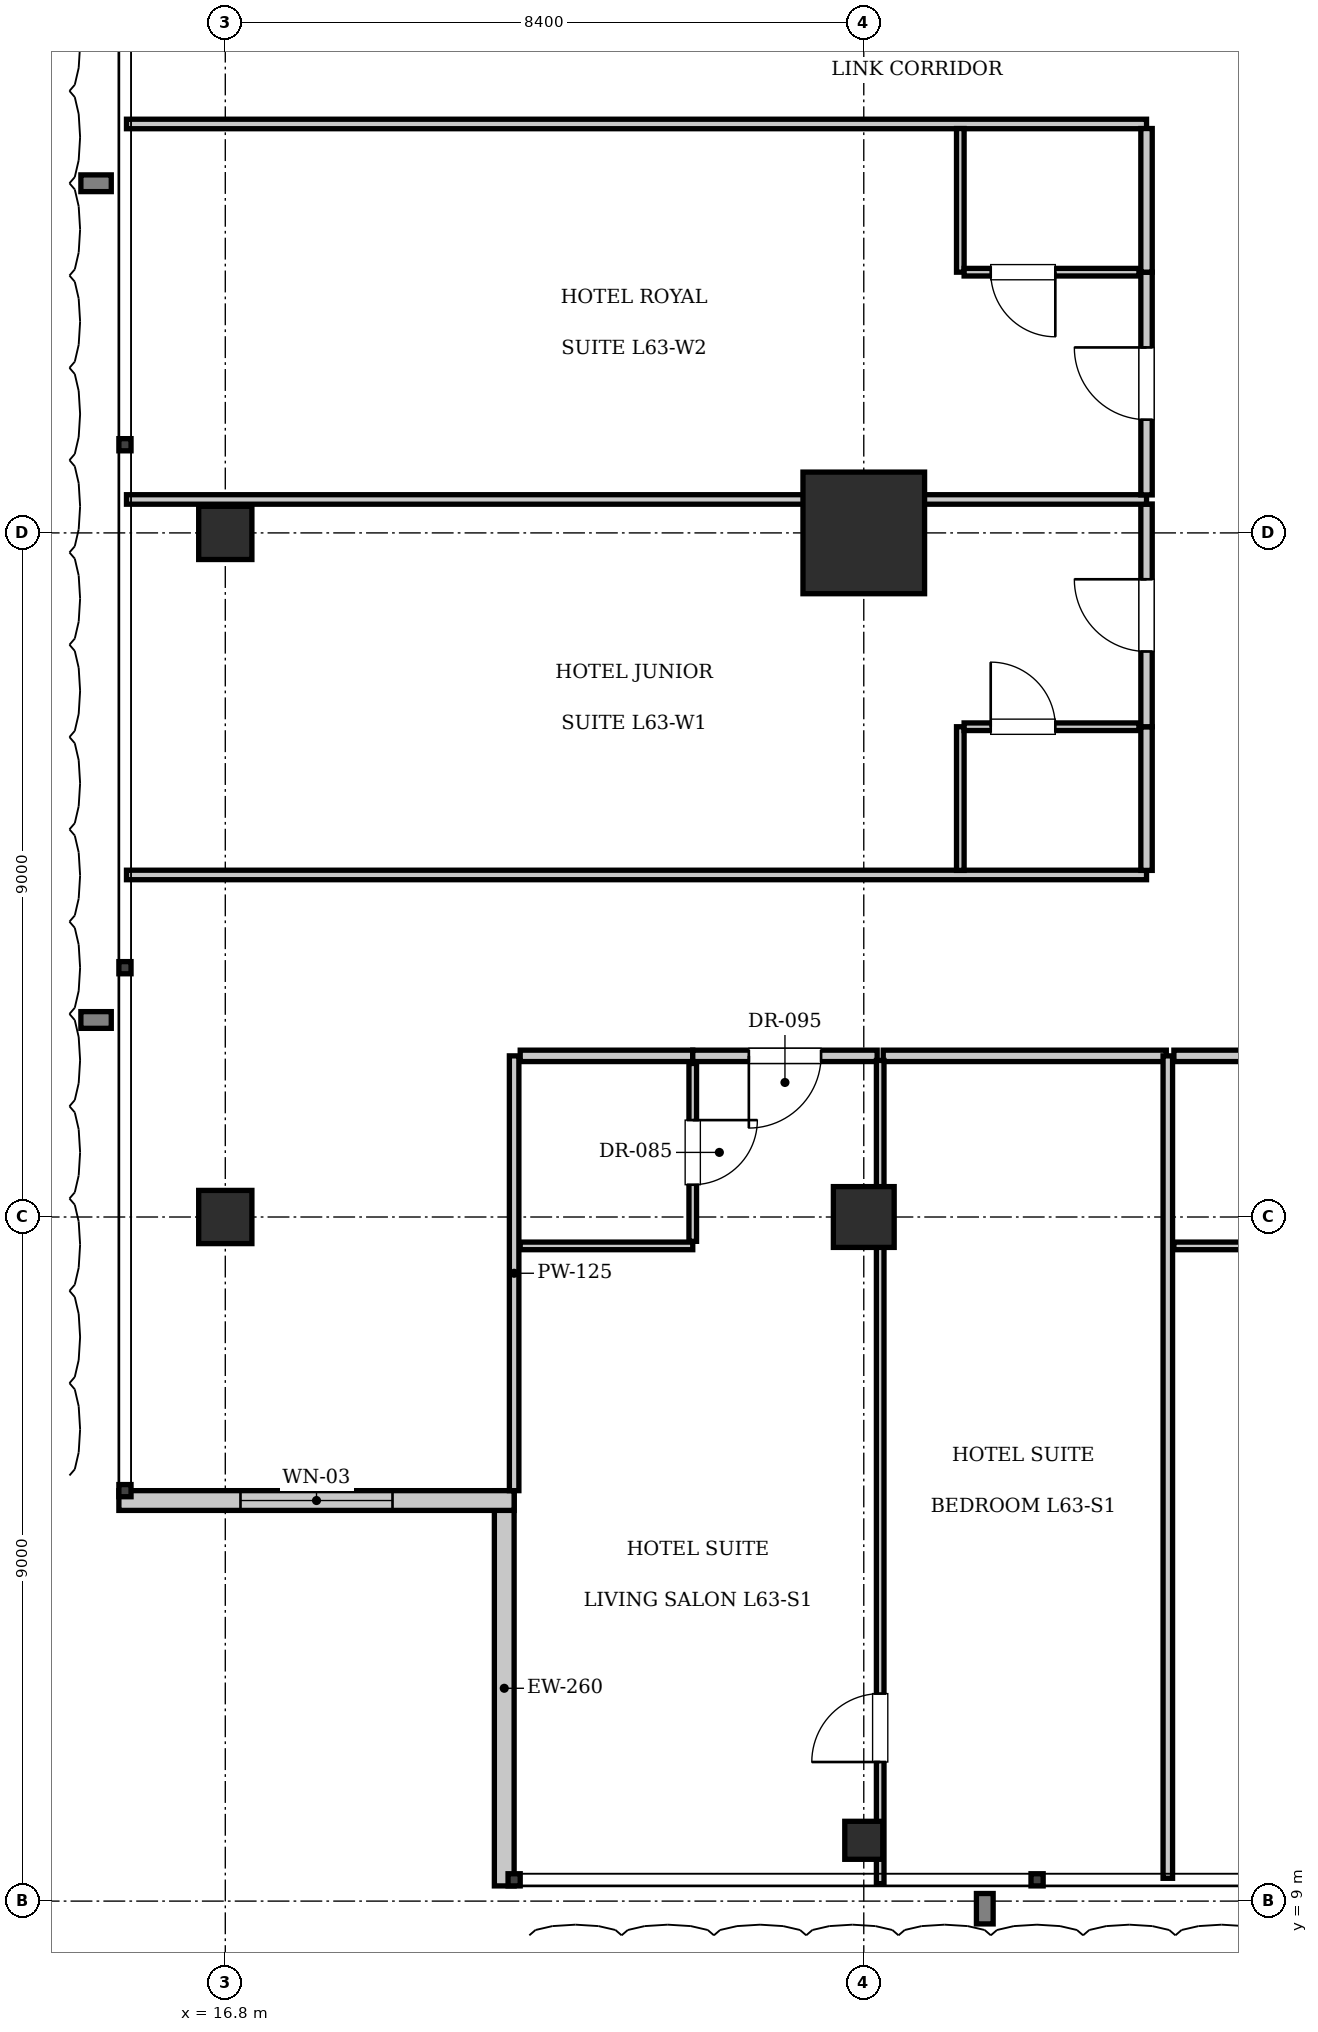
"""IFC4 building model, lengths in metres.
Left out: names, types, materials, properties, quantities, classifications, styles, units other than length and angle.
Written with IfcOpenShell. Run it as: python <this file> out.ifc"""

import sys

from ifc_helpers import new_model, si_unit, direction, frame, frame_2d, origin, origin_2d, place, context, subcontext, project, spatial, rectangle, i_section, extrude, element, fill, save


model = new_model("IFC4")
c1 = context("Model", 3, precision=1e-05, world=origin(), true_north=direction((0.0, 1.0)))
c2 = subcontext(c1, "Body", "Model", "MODEL_VIEW")
j1 = project(units=[si_unit("LENGTHUNIT", "METRE"), si_unit("PLANEANGLEUNIT", "RADIAN")], contexts=[c1])
p1 = place(None, origin())
s1 = spatial("IfcSite", under=j1, at=p1, CompositionType="ELEMENT")
p2 = place(p1, origin())
s2 = spatial("IfcBuilding", under=s1, at=p2, CompositionType="ELEMENT")
p3 = place(p2, frame((0.0, 0.0, 258.65)))
s3 = spatial("IfcBuildingStorey", under=s2, at=p3, CompositionType="ELEMENT", Elevation=258.65)
p4 = place(p3, frame((25.2, 27.0, 0.0), z_axis=(0.0, 0.0, 1.0), x_axis=(1.0, 0.0, 0.0)))
e1 = element("IfcColumn", 1, at=p4, inside=s3, PredefinedType="COLUMN", context=c2, shape_type="SweptSolid", body=[
    extrude(rectangle(XDim=1.6, YDim=1.6, at=origin_2d()), origin(), (0.0, 0.0, 1.0), 3.85),
])
p5 = place(p3, frame((25.2, 18.0, 0.0), z_axis=(0.0, 0.0, 1.0), x_axis=(1.0, 0.0, 0.0)))
e2 = element("IfcColumn", 2, at=p5, inside=s3, PredefinedType="COLUMN", context=c2, shape_type="SweptSolid", body=[
    extrude(rectangle(XDim=0.8, YDim=0.8, at=origin_2d()), origin(), (0.0, 0.0, 1.0), 3.85),
])
for number, where, z_axis, x_axis in (
    (3, (16.8, 18.0, 0.0), (0.0, 0.0, 1.0), (1.0, 0.0, 0.0)),
    (4, (16.8, 27.0, 0.0), (0.0, 0.0, 1.0), (1.0, 0.0, 0.0)),
):
    element("IfcColumn", number, at=place(p3, frame(where, z_axis=z_axis, x_axis=x_axis)), inside=s3, PredefinedType="COLUMN", context=c2, shape_type="SweptSolid", body=[
        extrude(rectangle(XDim=0.7, YDim=0.7, at=origin_2d()), origin(), (0.0, 0.0, 1.0), 3.85),
    ])
p6 = place(p3, frame((25.2, 9.8, 0.0), z_axis=(0.0, 0.0, 1.0), x_axis=(1.0, 0.0, 0.0)))
e5 = element("IfcColumn", 5, at=p6, inside=s3, PredefinedType="COLUMN", context=c2, shape_type="SweptSolid", body=[
    extrude(i_section(OverallWidth=0.5, OverallDepth=0.5, WebThickness=0.022, FlangeThickness=0.032, at=origin_2d()), origin(), (0.0, 0.0, 1.0), 3.85),
])
p7 = place(p3, frame((20.47, 9.2, 0.0), z_axis=(0.0, 0.0, 1.0), x_axis=(0.0, 1.0, 0.0)))
e6 = element("IfcWall", 6, at=p7, inside=s3, PredefinedType="SOLIDWALL", context=c2, shape_type="SweptSolid", body=[
    extrude(rectangle(XDim=5.2, YDim=0.26, at=frame_2d((2.6, 0.0))), origin(), (0.0, 0.0, 1.0), 3.61),
])
p8 = place(p3, frame((20.6, 14.27, 0.0), z_axis=(0.0, 0.0, 1.0), x_axis=(-1.0, 0.0, 0.0)))
e7 = element("IfcWall", 7, at=p8, inside=s3, PredefinedType="SOLIDWALL", context=c2, shape_type="SweptSolid", body=[
    extrude(rectangle(XDim=5.2, YDim=0.26, at=frame_2d((2.6, 0.0))), origin(), (0.0, 0.0, 1.0), 3.61),
])
p9 = place(p8, frame((1.6, 0.0, 0.9)))
e8 = element("IfcOpeningElement", 8, at=p9, cuts=e7, PredefinedType="OPENING", context=c2, shape_type="SweptSolid", body=[
    extrude(rectangle(XDim=2.0, YDim=2.2, at=frame_2d((1.0, 1.1))), frame((0.0, 0.14, 0.0), z_axis=(0.0, -1.0, 0.0), x_axis=(1.0, 0.0, 0.0)), (0.0, 0.0, 1.0), 0.28),
])
p10 = place(p3, frame((20.6, 14.4, 0.0), z_axis=(0.0, 0.0, 1.0), x_axis=(0.0, 1.0, 0.0)))
e9 = element("IfcWall", 9, at=p10, inside=s3, PredefinedType="PARTITIONING", context=c2, shape_type="SweptSolid", body=[
    extrude(rectangle(XDim=5.72, YDim=0.125, at=frame_2d((2.86, 0.0))), origin(), (0.0, 0.0, 1.0), 3.61),
])
p11 = place(p3, frame((20.68, 20.12, 0.0), z_axis=(0.0, 0.0, 1.0), x_axis=(1.0, 0.0, 0.0)))
e10 = element("IfcWall", 10, at=p11, inside=s3, PredefinedType="PARTITIONING", context=c2, shape_type="SweptSolid", body=[
    extrude(rectangle(XDim=2.27, YDim=0.15, at=frame_2d((1.135, 0.0))), origin(), (0.0, 0.0, 1.0), 3.61),
])
p12 = place(p3, frame((20.68, 17.62, 0.0), z_axis=(0.0, 0.0, 1.0), x_axis=(1.0, 0.0, 0.0)))
e11 = element("IfcWall", 11, at=p12, inside=s3, PredefinedType="PARTITIONING", context=c2, shape_type="SweptSolid", body=[
    extrude(rectangle(XDim=2.27, YDim=0.1, at=frame_2d((1.135, 0.0))), origin(), (0.0, 0.0, 1.0), 3.61),
])
p13 = place(p3, frame((22.95, 17.68, 0.0), z_axis=(0.0, 0.0, 1.0), x_axis=(0.0, 1.0, 0.0)))
e12 = element("IfcWall", 12, at=p13, inside=s3, PredefinedType="PARTITIONING", context=c2, shape_type="SweptSolid", body=[
    extrude(rectangle(XDim=2.34, YDim=0.1, at=frame_2d((1.17, 0.0))), origin(), (0.0, 0.0, 1.0), 3.61),
])
p14 = place(p13, frame((0.745, 0.0, 0.0)))
e13 = element("IfcOpeningElement", 13, at=p14, cuts=e12, PredefinedType="OPENING", context=c2, shape_type="SweptSolid", body=[
    extrude(rectangle(XDim=0.85, YDim=2.1, at=frame_2d((0.425, 1.05))), frame((0.0, 0.06, 0.0), z_axis=(0.0, -1.0, 0.0), x_axis=(1.0, 0.0, 0.0)), (0.0, 0.0, 1.0), 0.12),
])
p15 = place(p3, frame((22.95, 20.12, 0.0), z_axis=(0.0, 0.0, 1.0), x_axis=(1.0, 0.0, 0.0)))
e14 = element("IfcWall", 14, at=p15, inside=s3, PredefinedType="PARTITIONING", context=c2, shape_type="SweptSolid", body=[
    extrude(rectangle(XDim=2.426, YDim=0.15, at=frame_2d((1.213, 0.0))), origin(), (0.0, 0.0, 1.0), 3.61),
])
p16 = place(p15, frame((0.738, 0.0, 0.0)))
e15 = element("IfcOpeningElement", 15, at=p16, cuts=e14, PredefinedType="OPENING", context=c2, shape_type="SweptSolid", body=[
    extrude(rectangle(XDim=0.95, YDim=2.15, at=frame_2d((0.475, 1.075))), frame((0.0, 0.085, 0.0), z_axis=(0.0, -1.0, 0.0), x_axis=(1.0, 0.0, 0.0)), (0.0, 0.0, 1.0), 0.17),
])
p17 = place(p3, frame((25.456, 20.12, 0.0), z_axis=(0.0, 0.0, 1.0), x_axis=(1.0, 0.0, 0.0)))
e16 = element("IfcWall", 16, at=p17, inside=s3, PredefinedType="PARTITIONING", context=c2, shape_type="SweptSolid", body=[
    extrude(rectangle(XDim=3.724, YDim=0.15, at=frame_2d((1.862, 0.0))), origin(), (0.0, 0.0, 1.0), 3.61),
])
p18 = place(p3, frame((25.416, 9.23, 0.0), z_axis=(0.0, 0.0, 1.0), x_axis=(0.0, 1.0, 0.0)))
e17 = element("IfcWall", 17, at=p18, inside=s3, PredefinedType="PARTITIONING", context=c2, shape_type="SweptSolid", body=[
    extrude(rectangle(XDim=10.83, YDim=0.1, at=frame_2d((5.415, 0.0))), origin(), (0.0, 0.0, 1.0), 3.61),
])
p19 = place(p18, frame((1.6, 0.0, 0.0)))
e18 = element("IfcOpeningElement", 18, at=p19, cuts=e17, PredefinedType="OPENING", context=c2, shape_type="SweptSolid", body=[
    extrude(rectangle(XDim=0.9, YDim=2.1, at=frame_2d((0.45, 1.05))), frame((0.0, 0.06, 0.0), z_axis=(0.0, -1.0, 0.0), x_axis=(1.0, 0.0, 0.0)), (0.0, 0.0, 1.0), 0.12),
])
p20 = place(p3, frame((29.2, 9.3, 0.0), z_axis=(0.0, 0.0, 1.0), x_axis=(0.0, 1.0, 0.0)))
e19 = element("IfcWall", 19, at=p20, inside=s3, PredefinedType="PARTITIONING", context=c2, shape_type="SweptSolid", body=[
    extrude(rectangle(XDim=10.82, YDim=0.125, at=frame_2d((5.41, 0.0))), origin(), (0.0, 0.0, 1.0), 3.61),
])
p21 = place(p3, frame((29.28, 20.12, 0.0), z_axis=(0.0, 0.0, 1.0), x_axis=(1.0, 0.0, 0.0)))
e20 = element("IfcWall", 20, at=p21, inside=s3, PredefinedType="PARTITIONING", context=c2, shape_type="SweptSolid", body=[
    extrude(rectangle(XDim=2.27, YDim=0.15, at=frame_2d((1.135, 0.0))), origin(), (0.0, 0.0, 1.0), 3.61),
])
p22 = place(p3, frame((29.28, 17.62, 0.0), z_axis=(0.0, 0.0, 1.0), x_axis=(1.0, 0.0, 0.0)))
e21 = element("IfcWall", 21, at=p22, inside=s3, PredefinedType="PARTITIONING", context=c2, shape_type="SweptSolid", body=[
    extrude(rectangle(XDim=2.27, YDim=0.1, at=frame_2d((1.135, 0.0))), origin(), (0.0, 0.0, 1.0), 3.61),
])
for number, where, z_axis, x_axis in (
    (22, (15.5, 22.5, 0.0), (0.0, 0.0, 1.0), (1.0, 0.0, 0.0)),
    (23, (15.5, 32.38, 0.0), (0.0, 0.0, 1.0), (1.0, 0.0, 0.0)),
):
    element("IfcWall", number, at=place(p3, frame(where, z_axis=z_axis, x_axis=x_axis)), inside=s3, PredefinedType="PARTITIONING", context=c2, shape_type="SweptSolid", body=[
        extrude(rectangle(XDim=13.42, YDim=0.125, at=frame_2d((6.71, 0.0))), origin(), (0.0, 0.0, 1.0), 3.61),
    ])
p23 = place(p3, frame((28.92, 22.56, 0.0), z_axis=(0.0, 0.0, 1.0), x_axis=(0.0, 1.0, 0.0)))
e24 = element("IfcWall", 24, at=p23, inside=s3, PredefinedType="PARTITIONING", context=c2, shape_type="SweptSolid", body=[
    extrude(rectangle(XDim=1.89, YDim=0.15, at=frame_2d((0.945, 0.0))), origin(), (0.0, 0.0, 1.0), 3.61),
])
p24 = place(p3, frame((28.92, 24.45, 0.0), z_axis=(0.0, 0.0, 1.0), x_axis=(0.0, 1.0, 0.0)))
e25 = element("IfcWall", 25, at=p24, inside=s3, PredefinedType="PARTITIONING", context=c2, shape_type="SweptSolid", body=[
    extrude(rectangle(XDim=2.93, YDim=0.15, at=frame_2d((1.465, 0.0))), origin(), (0.0, 0.0, 1.0), 3.61),
])
p25 = place(p24, frame((0.99, 0.0, 0.0)))
e26 = element("IfcOpeningElement", 26, at=p25, cuts=e25, PredefinedType="OPENING", context=c2, shape_type="SweptSolid", body=[
    extrude(rectangle(XDim=0.95, YDim=2.15, at=frame_2d((0.475, 1.075))), frame((0.0, 0.085, 0.0), z_axis=(0.0, -1.0, 0.0), x_axis=(1.0, 0.0, 0.0)), (0.0, 0.0, 1.0), 0.17),
])
p26 = place(p3, frame((26.47, 22.56, 0.0), z_axis=(0.0, 0.0, 1.0), x_axis=(0.0, 1.0, 0.0)))
e27 = element("IfcWall", 27, at=p26, inside=s3, PredefinedType="PARTITIONING", context=c2, shape_type="SweptSolid", body=[
    extrude(rectangle(XDim=1.89, YDim=0.1, at=frame_2d((0.945, 0.0))), origin(), (0.0, 0.0, 1.0), 3.61),
])
p27 = place(p3, frame((26.52, 24.45, 0.0), z_axis=(0.0, 0.0, 1.0), x_axis=(1.0, 0.0, 0.0)))
e28 = element("IfcWall", 28, at=p27, inside=s3, PredefinedType="PARTITIONING", context=c2, shape_type="SweptSolid", body=[
    extrude(rectangle(XDim=2.3, YDim=0.1, at=frame_2d((1.15, 0.0))), origin(), (0.0, 0.0, 1.0), 3.61),
])
p28 = place(p27, frame((0.35, 0.0, 0.0)))
e29 = element("IfcOpeningElement", 29, at=p28, cuts=e28, PredefinedType="OPENING", context=c2, shape_type="SweptSolid", body=[
    extrude(rectangle(XDim=0.85, YDim=2.1, at=frame_2d((0.425, 1.05))), frame((0.0, 0.06, 0.0), z_axis=(0.0, -1.0, 0.0), x_axis=(1.0, 0.0, 0.0)), (0.0, 0.0, 1.0), 0.12),
])
p29 = place(p3, frame((15.5, 27.44, 0.0), z_axis=(0.0, 0.0, 1.0), x_axis=(1.0, 0.0, 0.0)))
e30 = element("IfcWall", 30, at=p29, inside=s3, PredefinedType="PARTITIONING", context=c2, shape_type="SweptSolid", body=[
    extrude(rectangle(XDim=13.42, YDim=0.125, at=frame_2d((6.71, 0.0))), origin(), (0.0, 0.0, 1.0), 3.61),
])
p30 = place(p3, frame((28.92, 27.5, 0.0), z_axis=(0.0, 0.0, 1.0), x_axis=(0.0, 1.0, 0.0)))
e31 = element("IfcWall", 31, at=p30, inside=s3, PredefinedType="PARTITIONING", context=c2, shape_type="SweptSolid", body=[
    extrude(rectangle(XDim=2.93, YDim=0.15, at=frame_2d((1.465, 0.0))), origin(), (0.0, 0.0, 1.0), 3.61),
])
p31 = place(p30, frame((0.99, 0.0, 0.0)))
e32 = element("IfcOpeningElement", 32, at=p31, cuts=e31, PredefinedType="OPENING", context=c2, shape_type="SweptSolid", body=[
    extrude(rectangle(XDim=0.95, YDim=2.15, at=frame_2d((0.475, 1.075))), frame((0.0, 0.085, 0.0), z_axis=(0.0, -1.0, 0.0), x_axis=(1.0, 0.0, 0.0)), (0.0, 0.0, 1.0), 0.17),
])
p32 = place(p3, frame((28.92, 30.43, 0.0), z_axis=(0.0, 0.0, 1.0), x_axis=(0.0, 1.0, 0.0)))
e33 = element("IfcWall", 33, at=p32, inside=s3, PredefinedType="PARTITIONING", context=c2, shape_type="SweptSolid", body=[
    extrude(rectangle(XDim=1.89, YDim=0.15, at=frame_2d((0.945, 0.0))), origin(), (0.0, 0.0, 1.0), 3.61),
])
p33 = place(p3, frame((26.47, 30.43, 0.0), z_axis=(0.0, 0.0, 1.0), x_axis=(0.0, 1.0, 0.0)))
e34 = element("IfcWall", 34, at=p33, inside=s3, PredefinedType="PARTITIONING", context=c2, shape_type="SweptSolid", body=[
    extrude(rectangle(XDim=1.89, YDim=0.1, at=frame_2d((0.945, 0.0))), origin(), (0.0, 0.0, 1.0), 3.61),
])
p34 = place(p3, frame((26.52, 30.43, 0.0), z_axis=(0.0, 0.0, 1.0), x_axis=(1.0, 0.0, 0.0)))
e35 = element("IfcWall", 35, at=p34, inside=s3, PredefinedType="PARTITIONING", context=c2, shape_type="SweptSolid", body=[
    extrude(rectangle(XDim=2.3, YDim=0.1, at=frame_2d((1.15, 0.0))), origin(), (0.0, 0.0, 1.0), 3.61),
])
p35 = place(p34, frame((0.35, 0.0, 0.0)))
e36 = element("IfcOpeningElement", 36, at=p35, cuts=e35, PredefinedType="OPENING", context=c2, shape_type="SweptSolid", body=[
    extrude(rectangle(XDim=0.85, YDim=2.1, at=frame_2d((0.425, 1.05))), frame((0.0, 0.06, 0.0), z_axis=(0.0, -1.0, 0.0), x_axis=(1.0, 0.0, 0.0)), (0.0, 0.0, 1.0), 0.12),
])
p36 = place(p9, origin())
e37 = element("IfcWindow", 37, at=p36, inside=s3, PartitioningType="SINGLE_PANEL", PredefinedType="WINDOW", context=c2, shape_type="SweptSolid", body=[
    extrude(rectangle(XDim=2.0, YDim=2.2, at=frame_2d((1.0, 1.1))), frame((0.0, 0.03, 0.0), z_axis=(0.0, -1.0, 0.0), x_axis=(1.0, 0.0, 0.0)), (0.0, 0.0, 1.0), 0.06),
])
fill(e8, e37)
p37 = place(p14, frame((0.85, 0.0, 0.0), z_axis=(0.0, 0.0, 1.0), x_axis=(-1.0, 0.0, 0.0)))
e38 = element("IfcDoor", 38, at=p37, inside=s3, OperationType="SINGLE_SWING_LEFT", PredefinedType="DOOR", context=c2, shape_type="SweptSolid", body=[
    extrude(rectangle(XDim=0.85, YDim=2.1, at=frame_2d((0.425, 1.05))), frame((0.0, 0.025, 0.0), z_axis=(0.0, -1.0, 0.0), x_axis=(1.0, 0.0, 0.0)), (0.0, 0.0, 1.0), 0.05),
])
fill(e13, e38)
p38 = place(p16, frame((0.95, 0.0, 0.0), z_axis=(0.0, 0.0, 1.0), x_axis=(-1.0, 0.0, 0.0)))
e39 = element("IfcDoor", 39, at=p38, inside=s3, OperationType="SINGLE_SWING_RIGHT", PredefinedType="DOOR", context=c2, shape_type="SweptSolid", body=[
    extrude(rectangle(XDim=0.95, YDim=2.15, at=frame_2d((0.475, 1.075))), frame((0.0, 0.025, 0.0), z_axis=(0.0, -1.0, 0.0), x_axis=(1.0, 0.0, 0.0)), (0.0, 0.0, 1.0), 0.05),
])
fill(e15, e39)
p39 = place(p19, origin())
e40 = element("IfcDoor", 40, at=p39, inside=s3, OperationType="SINGLE_SWING_LEFT", PredefinedType="DOOR", context=c2, shape_type="SweptSolid", body=[
    extrude(rectangle(XDim=0.9, YDim=2.1, at=frame_2d((0.45, 1.05))), frame((0.0, 0.025, 0.0), z_axis=(0.0, -1.0, 0.0), x_axis=(1.0, 0.0, 0.0)), (0.0, 0.0, 1.0), 0.05),
])
fill(e18, e40)
p40 = place(p28, origin())
e41 = element("IfcDoor", 41, at=p40, inside=s3, OperationType="SINGLE_SWING_LEFT", PredefinedType="DOOR", context=c2, shape_type="SweptSolid", body=[
    extrude(rectangle(XDim=0.85, YDim=2.1, at=frame_2d((0.425, 1.05))), frame((0.0, 0.025, 0.0), z_axis=(0.0, -1.0, 0.0), x_axis=(1.0, 0.0, 0.0)), (0.0, 0.0, 1.0), 0.05),
])
fill(e29, e41)
p41 = place(p25, origin())
e42 = element("IfcDoor", 42, at=p41, inside=s3, OperationType="SINGLE_SWING_RIGHT", PredefinedType="DOOR", context=c2, shape_type="SweptSolid", body=[
    extrude(rectangle(XDim=0.95, YDim=2.15, at=frame_2d((0.475, 1.075))), frame((0.0, 0.025, 0.0), z_axis=(0.0, -1.0, 0.0), x_axis=(1.0, 0.0, 0.0)), (0.0, 0.0, 1.0), 0.05),
])
fill(e26, e42)
p42 = place(p35, frame((0.85, 0.0, 0.0), z_axis=(0.0, 0.0, 1.0), x_axis=(-1.0, 0.0, 0.0)))
e43 = element("IfcDoor", 43, at=p42, inside=s3, OperationType="SINGLE_SWING_LEFT", PredefinedType="DOOR", context=c2, shape_type="SweptSolid", body=[
    extrude(rectangle(XDim=0.85, YDim=2.1, at=frame_2d((0.425, 1.05))), frame((0.0, 0.025, 0.0), z_axis=(0.0, -1.0, 0.0), x_axis=(1.0, 0.0, 0.0)), (0.0, 0.0, 1.0), 0.05),
])
fill(e36, e43)
p43 = place(p31, origin())
e44 = element("IfcDoor", 44, at=p43, inside=s3, OperationType="SINGLE_SWING_RIGHT", PredefinedType="DOOR", context=c2, shape_type="SweptSolid", body=[
    extrude(rectangle(XDim=0.95, YDim=2.15, at=frame_2d((0.475, 1.075))), frame((0.0, 0.025, 0.0), z_axis=(0.0, -1.0, 0.0), x_axis=(1.0, 0.0, 0.0)), (0.0, 0.0, 1.0), 0.05),
])
fill(e32, e44)
save(model, sys.argv[1])
